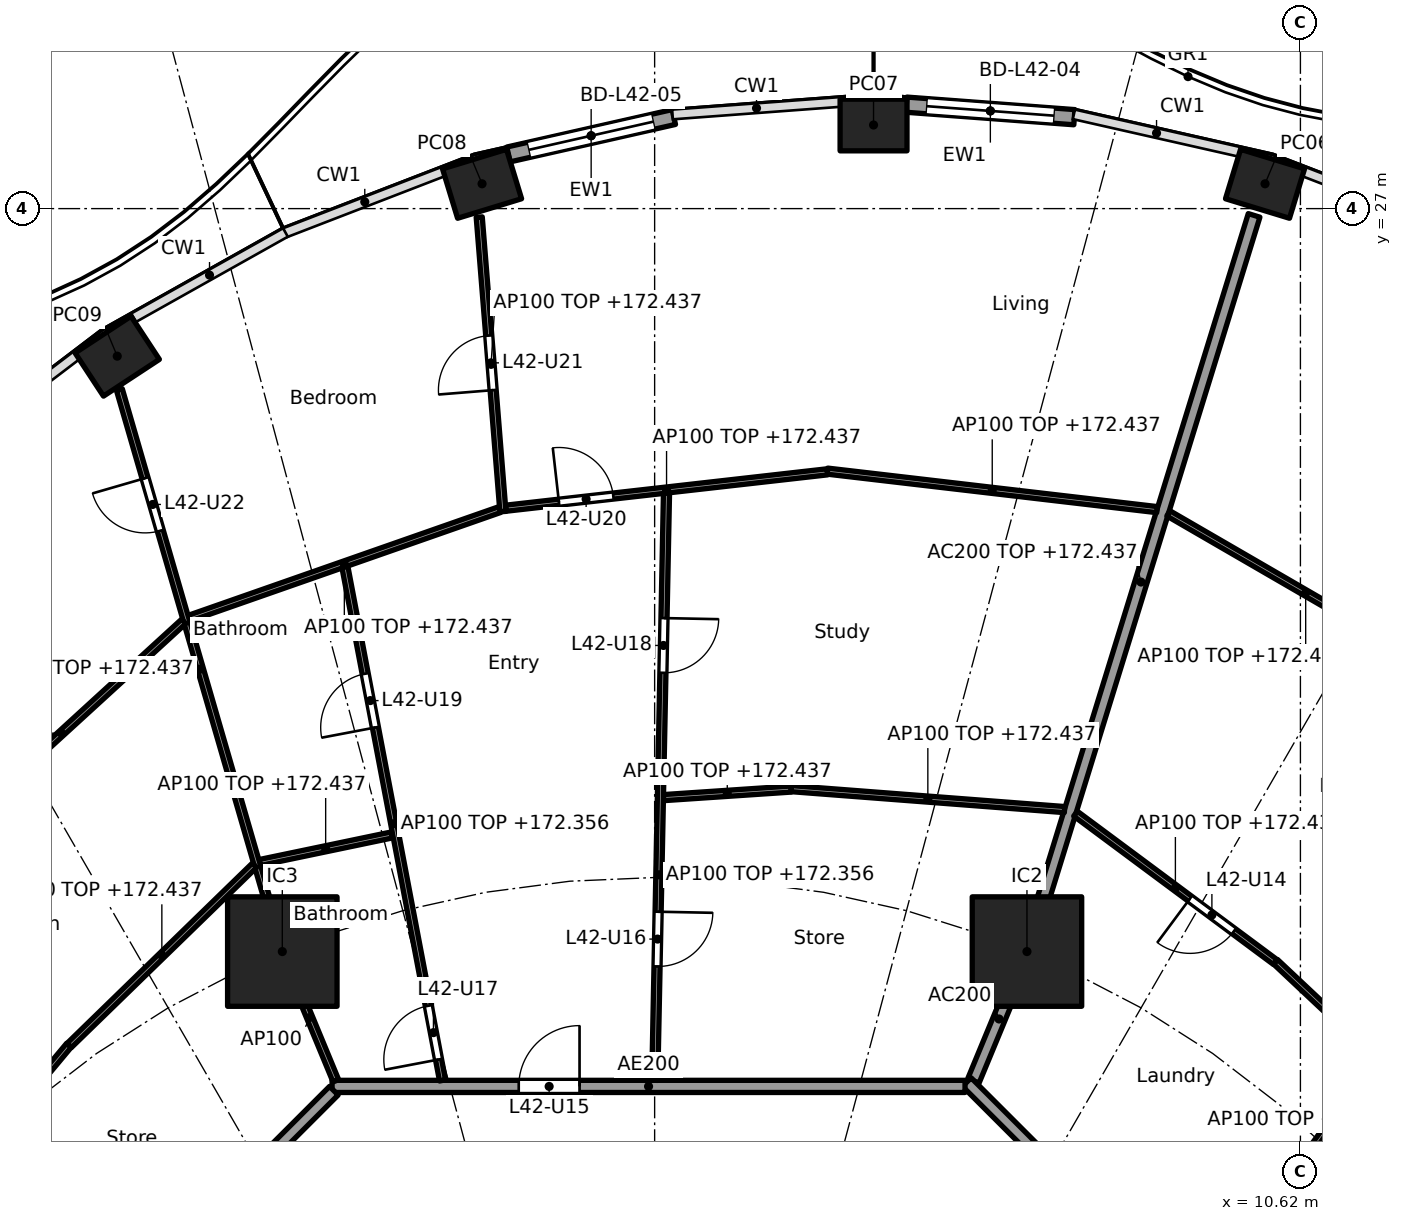
"""IFC4 building model, lengths in metres.
Left out: names, types, materials, properties, quantities, classifications, styles, units other than length and angle.
Written with IfcOpenShell. Run it as: python <this file> out.ifc"""

import sys

from ifc_helpers import new_model, si_unit, direction, frame, frame_2d, origin, origin_2d, place, context, subcontext, project, spatial, rectangle, hollow_rectangle, extrude, element, fill, save


model = new_model("IFC4")
c1 = context("Model", 3, precision=1e-05, world=origin(), true_north=direction((0.0, 1.0)))
c2 = subcontext(c1, "Body", "Model", "MODEL_VIEW")
j1 = project(units=[si_unit("LENGTHUNIT", "METRE"), si_unit("PLANEANGLEUNIT", "RADIAN")], contexts=[c1])
p1 = place(None, origin())
s1 = spatial("IfcSite", under=j1, at=p1, CompositionType="ELEMENT")
p2 = place(p1, origin())
s2 = spatial("IfcBuilding", under=s1, at=p2, CompositionType="ELEMENT")
p3 = place(p2, frame((0.0, 0.0, 169.6)))
s3 = spatial("IfcBuildingStorey", under=s2, at=p3, CompositionType="ELEMENT", Elevation=169.6)
for number, where, z_axis, x_axis in (
    (1, (10.038, 27.408, 0.0), (0.0, 0.0, 1.0), (-0.957, 0.292, 0.0)),
    (2, (3.6, 28.375, 0.0), (0.0, 0.0, 1.0), (-1.0, 0.0, 0.0)),
    (3, (-2.838, 27.408, 0.0), (0.0, 0.0, 1.0), (-0.957, -0.292, 0.0)),
    (4, (-8.837, 24.573, 0.0), (0.0, 0.0, 1.0), (-0.836, -0.549, 0.0)),
):
    element("IfcColumn", number, at=place(p3, frame(where, z_axis=z_axis, x_axis=x_axis)), inside=s3, PredefinedType="COLUMN", context=c2, shape_type="SweptSolid", body=[
        extrude(hollow_rectangle(XDim=1.1, YDim=0.85, WallThickness=0.036, at=origin_2d()), origin(), (0.0, 0.0, 1.0), 3.7),
    ])
for number, where, z_axis, x_axis in (
    (5, (6.123, 14.782, 0.0), (0.0, 0.0, 1.0), (1.0, 0.0, 0.0)),
    (6, (-6.123, 14.782, 0.0), (0.0, 0.0, 1.0), (1.0, 0.0, 0.0)),
):
    element("IfcColumn", number, at=place(p3, frame(where, z_axis=z_axis, x_axis=x_axis)), inside=s3, PredefinedType="COLUMN", context=c2, shape_type="SweptSolid", body=[
        extrude(rectangle(XDim=1.8, YDim=1.8, at=origin_2d()), origin(), (0.0, 0.0, 1.0), 3.7),
    ])
p4 = place(p3, frame((4.139, 28.709, 0.0), z_axis=(0.0, 0.0, 1.0), x_axis=(0.997232064422, -0.074351931305, 0.0)))
e7 = element("IfcWall", 7, at=p4, inside=s3, PredefinedType="SOLIDWALL", context=c2, shape_type="SweptSolid", body=[
    extrude(rectangle(XDim=2.771, YDim=0.25, at=frame_2d((1.386, 0.0))), origin(), (0.0, 0.0, 1.0), 3.44),
])
p5 = place(p4, frame((0.336, 0.0, 0.0)))
e8 = element("IfcOpeningElement", 8, at=p5, cuts=e7, PredefinedType="OPENING", context=c2, shape_type="SweptSolid", body=[
    extrude(rectangle(XDim=2.1, YDim=2.4, at=frame_2d((1.05, 1.2))), frame((0.0, 0.135, 0.0), z_axis=(0.0, -1.0, 0.0), x_axis=(1.0, 0.0, 0.0)), (0.0, 0.0, 1.0), 0.27),
])
p6 = place(p3, frame((-2.404, 27.891, 0.0), z_axis=(0.0, 0.0, 1.0), x_axis=(0.975324329911, 0.220776926974, 0.0)))
e9 = element("IfcWall", 9, at=p6, inside=s3, PredefinedType="SOLIDWALL", context=c2, shape_type="SweptSolid", body=[
    extrude(rectangle(XDim=2.788, YDim=0.25, at=frame_2d((1.394, 0.0))), origin(), (0.0, 0.0, 1.0), 3.44),
])
p7 = place(p6, frame((0.344, 0.0, 0.0)))
e10 = element("IfcOpeningElement", 10, at=p7, cuts=e9, PredefinedType="OPENING", context=c2, shape_type="SweptSolid", body=[
    extrude(rectangle(XDim=2.1, YDim=2.4, at=frame_2d((1.05, 1.2))), frame((0.0, 0.135, 0.0), z_axis=(0.0, -1.0, 0.0), x_axis=(1.0, 0.0, 0.0)), (0.0, 0.0, 1.0), 0.27),
])
p8 = place(p3, frame((5.243, 12.657, 0.0), z_axis=(0.0, 0.0, 1.0), x_axis=(0.382747093259, 0.923853160736, 0.0)))
e11 = element("IfcWall", 11, at=p8, inside=s3, PredefinedType="PARTITIONING", context=c2, shape_type="SweptSolid", body=[
    extrude(rectangle(XDim=2.2, YDim=0.2, at=frame_2d((1.1, 0.0))), origin(), (0.0, 0.0, 1.0), 3.44),
])
p9 = place(p3, frame((6.138, 14.83, 0.0), z_axis=(0.0, 0.0, 1.0), x_axis=(0.294818517221, 0.955553264818, 0.0)))
e12 = element("IfcWall", 12, at=p9, inside=s3, PredefinedType="PARTITIONING", context=c2, shape_type="SweptSolid", body=[
    extrude(rectangle(XDim=12.619, YDim=0.2, at=frame_2d((6.31, 0.0))), origin(), (0.0, 0.0, 1.0), 2.837),
])
p10 = place(p3, frame((12.635, 5.134, 0.0), z_axis=(0.0, 0.0, 1.0), x_axis=(-0.707106781187, 0.707106781187, 0.0)))
e13 = element("IfcWall", 13, at=p10, inside=s3, PredefinedType="PARTITIONING", context=c2, shape_type="SweptSolid", body=[
    extrude(rectangle(XDim=10.609, YDim=0.2, at=frame_2d((5.305, 0.0))), origin(), (0.0, 0.0, 1.0), 3.44),
])
p11 = place(p3, frame((5.104, 12.565, 0.0), z_axis=(0.0, 0.0, 1.0), x_axis=(-1.0, 0.0, 0.0)))
e14 = element("IfcWall", 14, at=p11, inside=s3, PredefinedType="PARTITIONING", context=c2, shape_type="SweptSolid", body=[
    extrude(rectangle(XDim=10.409, YDim=0.2, at=frame_2d((5.205, 0.0))), origin(), (0.0, 0.0, 1.0), 3.44),
])
p12 = place(p11, frame((6.339, 0.0, 0.0)))
e15 = element("IfcOpeningElement", 15, at=p12, cuts=e14, PredefinedType="OPENING", context=c2, shape_type="SweptSolid", body=[
    extrude(rectangle(XDim=1.0, YDim=2.1, at=frame_2d((0.5, 1.05))), frame((0.0, 0.11, 0.0), z_axis=(0.0, -1.0, 0.0), x_axis=(1.0, 0.0, 0.0)), (0.0, 0.0, 1.0), 0.22),
])
p13 = place(p3, frame((-5.275, 12.494, 0.0), z_axis=(0.0, 0.0, 1.0), x_axis=(-0.707106781187, -0.707106781187, 0.0)))
e16 = element("IfcWall", 16, at=p13, inside=s3, PredefinedType="PARTITIONING", context=c2, shape_type="SweptSolid", body=[
    extrude(rectangle(XDim=10.209, YDim=0.2, at=frame_2d((5.104, 0.0))), origin(), (0.0, 0.0, 1.0), 3.44),
])
p14 = place(p3, frame((13.504, 11.52, 0.0), z_axis=(0.0, 0.0, 1.0), x_axis=(-0.728883199496, 0.684638066055, 0.0)))
e17 = element("IfcWall", 17, at=p14, inside=s3, PredefinedType="PARTITIONING", context=c2, shape_type="SweptSolid", body=[
    extrude(rectangle(XDim=4.519, YDim=0.1, at=frame_2d((2.26, 0.0))), origin(), (0.0, 0.0, 1.0), 2.837),
])
p15 = place(p3, frame((8.943, 8.966, 0.0), z_axis=(0.0, 0.0, 1.0), x_axis=(0.587187896734, 0.809450661825, 0.0)))
e18 = element("IfcWall", 18, at=p15, inside=s3, PredefinedType="PARTITIONING", context=c2, shape_type="SweptSolid", body=[
    extrude(rectangle(XDim=4.975, YDim=0.1, at=frame_2d((2.487, 0.0))), origin(), (0.0, 0.0, 1.0), 2.756),
])
p16 = place(p3, frame((10.207, 14.61, 0.0), z_axis=(0.0, 0.0, 1.0), x_axis=(-0.802769141821, 0.596289950394, 0.0)))
e19 = element("IfcWall", 19, at=p16, inside=s3, PredefinedType="PARTITIONING", context=c2, shape_type="SweptSolid", body=[
    extrude(rectangle(XDim=4.092, YDim=0.1, at=frame_2d((2.046, 0.0))), origin(), (0.0, 0.0, 1.0), 2.837),
])
p17 = place(p16, frame((0.848, 0.0, 0.0)))
e20 = element("IfcOpeningElement", 20, at=p17, cuts=e19, PredefinedType="OPENING", context=c2, shape_type="SweptSolid", body=[
    extrude(rectangle(XDim=0.9, YDim=2.1, at=frame_2d((0.45, 1.05))), frame((0.0, 0.06, 0.0), z_axis=(0.0, -1.0, 0.0), x_axis=(1.0, 0.0, 0.0)), (0.0, 0.0, 1.0), 0.12),
])
p18 = place(p3, frame((12.965, 19.371, 0.0), z_axis=(0.0, 0.0, 1.0), x_axis=(-0.865286427811, 0.501277765163, 0.0)))
e21 = element("IfcWall", 21, at=p18, inside=s3, PredefinedType="PARTITIONING", context=c2, shape_type="SweptSolid", body=[
    extrude(rectangle(XDim=5.22, YDim=0.1, at=frame_2d((2.61, 0.0))), origin(), (0.0, 0.0, 1.0), 2.837),
])
p19 = place(p3, frame((6.741, 17.117, 0.0), z_axis=(0.0, 0.0, 1.0), x_axis=(-0.997078320723, 0.076386008825, 0.0)))
e22 = element("IfcWall", 22, at=p19, inside=s3, PredefinedType="PARTITIONING", context=c2, shape_type="SweptSolid", body=[
    extrude(rectangle(XDim=4.51, YDim=0.1, at=frame_2d((2.255, 0.0))), origin(), (0.0, 0.0, 1.0), 2.837),
])
p20 = place(p3, frame((8.262, 22.05, 0.0), z_axis=(0.0, 0.0, 1.0), x_axis=(-0.993250089265, 0.115992500516, 0.0)))
e23 = element("IfcWall", 23, at=p20, inside=s3, PredefinedType="PARTITIONING", context=c2, shape_type="SweptSolid", body=[
    extrude(rectangle(XDim=5.458, YDim=0.1, at=frame_2d((2.729, 0.0))), origin(), (0.0, 0.0, 1.0), 2.837),
])
p21 = place(p3, frame((2.244, 17.455, 0.0), z_axis=(0.0, 0.0, 1.0), x_axis=(-0.997756833447, -0.06694252243, 0.0)))
e24 = element("IfcWall", 24, at=p21, inside=s3, PredefinedType="PARTITIONING", context=c2, shape_type="SweptSolid", body=[
    extrude(rectangle(XDim=2.104, YDim=0.1, at=frame_2d((1.052, 0.0))), origin(), (0.0, 0.0, 1.0), 2.837),
])
p22 = place(p3, frame((2.842, 22.671, 0.0), z_axis=(0.0, 0.0, 1.0), x_axis=(-0.993660315081, -0.112424099879, 0.0)))
e25 = element("IfcWall", 25, at=p22, inside=s3, PredefinedType="PARTITIONING", context=c2, shape_type="SweptSolid", body=[
    extrude(rectangle(XDim=5.325, YDim=0.1, at=frame_2d((2.662, 0.0))), origin(), (0.0, 0.0, 1.0), 2.837),
])
p23 = place(p22, frame((3.544, 0.0, 0.0)))
e26 = element("IfcOpeningElement", 26, at=p23, cuts=e25, PredefinedType="OPENING", context=c2, shape_type="SweptSolid", body=[
    extrude(rectangle(XDim=0.9, YDim=2.1, at=frame_2d((0.45, 1.05))), frame((0.0, 0.06, 0.0), z_axis=(0.0, -1.0, 0.0), x_axis=(1.0, 0.0, 0.0)), (0.0, 0.0, 1.0), 0.12),
])
p24 = place(p3, frame((0.002, 12.665, 0.0), z_axis=(0.0, 0.0, 1.0), x_axis=(0.019992969345, 0.999800120613, 0.0)))
e27 = element("IfcWall", 27, at=p24, inside=s3, PredefinedType="PARTITIONING", context=c2, shape_type="SweptSolid", body=[
    extrude(rectangle(XDim=9.659, YDim=0.1, at=frame_2d((4.83, 0.0))), origin(), (0.0, 0.0, 1.0), 2.756),
])
p25 = place(p24, frame((1.873, 0.0, 0.0)))
e28 = element("IfcOpeningElement", 28, at=p25, cuts=e27, PredefinedType="OPENING", context=c2, shape_type="SweptSolid", body=[
    extrude(rectangle(XDim=0.9, YDim=2.1, at=frame_2d((0.45, 1.05))), frame((0.0, 0.06, 0.0), z_axis=(0.0, -1.0, 0.0), x_axis=(1.0, 0.0, 0.0)), (0.0, 0.0, 1.0), 0.12),
])
p26 = place(p24, frame((6.703, 0.0, 0.0)))
e29 = element("IfcOpeningElement", 29, at=p26, cuts=e27, PredefinedType="OPENING", context=c2, shape_type="SweptSolid", body=[
    extrude(rectangle(XDim=0.9, YDim=2.1, at=frame_2d((0.45, 1.05))), frame((0.0, 0.06, 0.0), z_axis=(0.0, -1.0, 0.0), x_axis=(1.0, 0.0, 0.0)), (0.0, 0.0, 1.0), 0.12),
])
p27 = place(p3, frame((-2.495, 22.017, 0.0), z_axis=(0.0, 0.0, 1.0), x_axis=(-0.080150660566, 0.99678276049, 0.0)))
e30 = element("IfcWall", 30, at=p27, inside=s3, PredefinedType="PARTITIONING", context=c2, shape_type="SweptSolid", body=[
    extrude(rectangle(XDim=4.858, YDim=0.1, at=frame_2d((2.429, 0.0))), origin(), (0.0, 0.0, 1.0), 2.837),
])
p28 = place(p27, frame((2.004, 0.0, 0.0)))
e31 = element("IfcOpeningElement", 31, at=p28, cuts=e30, PredefinedType="OPENING", context=c2, shape_type="SweptSolid", body=[
    extrude(rectangle(XDim=0.9, YDim=2.1, at=frame_2d((0.45, 1.05))), frame((0.0, 0.06, 0.0), z_axis=(0.0, -1.0, 0.0), x_axis=(1.0, 0.0, 0.0)), (0.0, 0.0, 1.0), 0.12),
])
p29 = place(p3, frame((-2.546, 22.051, 0.0), z_axis=(0.0, 0.0, 1.0), x_axis=(-0.943911038661, -0.330199865375, 0.0)))
e32 = element("IfcWall", 32, at=p29, inside=s3, PredefinedType="PARTITIONING", context=c2, shape_type="SweptSolid", body=[
    extrude(rectangle(XDim=5.417, YDim=0.1, at=frame_2d((2.709, 0.0))), origin(), (0.0, 0.0, 1.0), 2.837),
])
p30 = place(p3, frame((-3.488, 12.663, 0.0), z_axis=(0.0, 0.0, 1.0), x_axis=(-0.186783185485, 0.982401161247, 0.0)))
e33 = element("IfcWall", 33, at=p30, inside=s3, PredefinedType="PARTITIONING", context=c2, shape_type="SweptSolid", body=[
    extrude(rectangle(XDim=8.595, YDim=0.1, at=frame_2d((4.298, 0.0))), origin(), (0.0, 0.0, 1.0), 2.756),
])
p31 = place(p30, frame((0.35, 0.0, 0.0)))
e34 = element("IfcOpeningElement", 34, at=p31, cuts=e33, PredefinedType="OPENING", context=c2, shape_type="SweptSolid", body=[
    extrude(rectangle(XDim=0.9, YDim=2.1, at=frame_2d((0.45, 1.05))), frame((0.0, 0.06, 0.0), z_axis=(0.0, -1.0, 0.0), x_axis=(1.0, 0.0, 0.0)), (0.0, 0.0, 1.0), 0.12),
])
p32 = place(p30, frame((5.908, 0.0, 0.0)))
e35 = element("IfcOpeningElement", 35, at=p32, cuts=e33, PredefinedType="OPENING", context=c2, shape_type="SweptSolid", body=[
    extrude(rectangle(XDim=0.9, YDim=2.1, at=frame_2d((0.45, 1.05))), frame((0.0, 0.06, 0.0), z_axis=(0.0, -1.0, 0.0), x_axis=(1.0, 0.0, 0.0)), (0.0, 0.0, 1.0), 0.12),
])
p33 = place(p3, frame((-4.324, 16.699, 0.0), z_axis=(0.0, 0.0, 1.0), x_axis=(-0.978908011866, -0.204301503432, 0.0)))
e36 = element("IfcWall", 36, at=p33, inside=s3, PredefinedType="PARTITIONING", context=c2, shape_type="SweptSolid", body=[
    extrude(rectangle(XDim=2.218, YDim=0.1, at=frame_2d((1.109, 0.0))), origin(), (0.0, 0.0, 1.0), 2.837),
])
p34 = place(p3, frame((-5.243, 12.657, 0.0), z_axis=(0.0, 0.0, 1.0), x_axis=(-0.382719158442, 0.923864733477, 0.0)))
e37 = element("IfcWall", 37, at=p34, inside=s3, PredefinedType="PARTITIONING", context=c2, shape_type="SweptSolid", body=[
    extrude(rectangle(XDim=2.25, YDim=0.1, at=frame_2d((1.125, 0.0))), origin(), (0.0, 0.0, 1.0), 3.44),
])
p35 = place(p3, frame((-6.137, 14.83, 0.0), z_axis=(0.0, 0.0, 1.0), x_axis=(-0.278461169897, 0.96044748782, 0.0)))
e38 = element("IfcWall", 38, at=p35, inside=s3, PredefinedType="PARTITIONING", context=c2, shape_type="SweptSolid", body=[
    extrude(rectangle(XDim=9.573, YDim=0.1, at=frame_2d((4.787, 0.0))), origin(), (0.0, 0.0, 1.0), 2.837),
])
p36 = place(p35, frame((7.156, 0.0, 0.0)))
e39 = element("IfcOpeningElement", 39, at=p36, cuts=e38, PredefinedType="OPENING", context=c2, shape_type="SweptSolid", body=[
    extrude(rectangle(XDim=0.9, YDim=2.1, at=frame_2d((0.45, 1.05))), frame((0.0, 0.06, 0.0), z_axis=(0.0, -1.0, 0.0), x_axis=(1.0, 0.0, 0.0)), (0.0, 0.0, 1.0), 0.12),
])
p37 = place(p3, frame((-6.58, 16.201, 0.0), z_axis=(0.0, 0.0, 1.0), x_axis=(-0.716946269374, -0.697128429223, 0.0)))
e40 = element("IfcWall", 40, at=p37, inside=s3, PredefinedType="PARTITIONING", context=c2, shape_type="SweptSolid", body=[
    extrude(rectangle(XDim=4.25, YDim=0.1, at=frame_2d((2.125, 0.0))), origin(), (0.0, 0.0, 1.0), 2.837),
])
p38 = place(p3, frame((-7.744, 20.212, 0.0), z_axis=(0.0, 0.0, 1.0), x_axis=(-0.738051761282, -0.674744097913, 0.0)))
e41 = element("IfcWall", 41, at=p38, inside=s3, PredefinedType="PARTITIONING", context=c2, shape_type="SweptSolid", body=[
    extrude(rectangle(XDim=5.449, YDim=0.1, at=frame_2d((2.725, 0.0))), origin(), (0.0, 0.0, 1.0), 2.837),
])
p39 = place(p3, frame((-9.631, 13.242, 0.0), z_axis=(0.0, 0.0, 1.0), x_axis=(-0.640315711982, -0.768111833647, 0.0)))
e42 = element("IfcWall", 42, at=p39, inside=s3, PredefinedType="PARTITIONING", context=c2, shape_type="SweptSolid", body=[
    extrude(rectangle(XDim=4.572, YDim=0.1, at=frame_2d((2.286, 0.0))), origin(), (0.0, 0.0, 1.0), 2.837),
])
p40 = place(p39, frame((1.861, 0.0, 0.0)))
e43 = element("IfcOpeningElement", 43, at=p40, cuts=e42, PredefinedType="OPENING", context=c2, shape_type="SweptSolid", body=[
    extrude(rectangle(XDim=0.9, YDim=2.1, at=frame_2d((0.45, 1.05))), frame((0.0, 0.06, 0.0), z_axis=(0.0, -1.0, 0.0), x_axis=(1.0, 0.0, 0.0)), (0.0, 0.0, 1.0), 0.12),
])
p41 = place(p5, origin())
e44 = element("IfcDoor", 44, at=p41, inside=s3, OperationType="SLIDING_TO_LEFT", PredefinedType="DOOR", context=c2, shape_type="SweptSolid", body=[
    extrude(rectangle(XDim=2.1, YDim=2.4, at=frame_2d((1.05, 1.2))), frame((0.0, 0.025, 0.0), z_axis=(0.0, -1.0, 0.0), x_axis=(1.0, 0.0, 0.0)), (0.0, 0.0, 1.0), 0.05),
])
fill(e8, e44)
p42 = place(p7, origin())
e45 = element("IfcDoor", 45, at=p42, inside=s3, OperationType="SLIDING_TO_LEFT", PredefinedType="DOOR", context=c2, shape_type="SweptSolid", body=[
    extrude(rectangle(XDim=2.1, YDim=2.4, at=frame_2d((1.05, 1.2))), frame((0.0, 0.025, 0.0), z_axis=(0.0, -1.0, 0.0), x_axis=(1.0, 0.0, 0.0)), (0.0, 0.0, 1.0), 0.05),
])
fill(e10, e45)
p43 = place(p17, origin())
e46 = element("IfcDoor", 46, at=p43, inside=s3, OperationType="SINGLE_SWING_RIGHT", PredefinedType="DOOR", context=c2, shape_type="SweptSolid", body=[
    extrude(rectangle(XDim=0.9, YDim=2.1, at=frame_2d((0.45, 1.05))), frame((0.0, 0.025, 0.0), z_axis=(0.0, -1.0, 0.0), x_axis=(1.0, 0.0, 0.0)), (0.0, 0.0, 1.0), 0.05),
])
fill(e20, e46)
p44 = place(p12, frame((1.0, 0.0, 0.0), x_axis=(-1.0, 0.0, 0.0)))
e47 = element("IfcDoor", 47, at=p44, inside=s3, OperationType="SINGLE_SWING_RIGHT", PredefinedType="DOOR", context=c2, shape_type="SweptSolid", body=[
    extrude(rectangle(XDim=1.0, YDim=2.1, at=frame_2d((0.5, 1.05))), frame((0.0, 0.025, 0.0), z_axis=(0.0, -1.0, 0.0), x_axis=(1.0, 0.0, 0.0)), (0.0, 0.0, 1.0), 0.05),
])
fill(e15, e47)
p45 = place(p25, frame((0.9, 0.0, 0.0), x_axis=(-1.0, 0.0, 0.0)))
e48 = element("IfcDoor", 48, at=p45, inside=s3, OperationType="SINGLE_SWING_LEFT", PredefinedType="DOOR", context=c2, shape_type="SweptSolid", body=[
    extrude(rectangle(XDim=0.9, YDim=2.1, at=frame_2d((0.45, 1.05))), frame((0.0, 0.025, 0.0), z_axis=(0.0, -1.0, 0.0), x_axis=(1.0, 0.0, 0.0)), (0.0, 0.0, 1.0), 0.05),
])
fill(e28, e48)
p46 = place(p31, origin())
e49 = element("IfcDoor", 49, at=p46, inside=s3, OperationType="SINGLE_SWING_LEFT", PredefinedType="DOOR", context=c2, shape_type="SweptSolid", body=[
    extrude(rectangle(XDim=0.9, YDim=2.1, at=frame_2d((0.45, 1.05))), frame((0.0, 0.025, 0.0), z_axis=(0.0, -1.0, 0.0), x_axis=(1.0, 0.0, 0.0)), (0.0, 0.0, 1.0), 0.05),
])
fill(e34, e49)
p47 = place(p26, frame((0.9, 0.0, 0.0), x_axis=(-1.0, 0.0, 0.0)))
e50 = element("IfcDoor", 50, at=p47, inside=s3, OperationType="SINGLE_SWING_LEFT", PredefinedType="DOOR", context=c2, shape_type="SweptSolid", body=[
    extrude(rectangle(XDim=0.9, YDim=2.1, at=frame_2d((0.45, 1.05))), frame((0.0, 0.025, 0.0), z_axis=(0.0, -1.0, 0.0), x_axis=(1.0, 0.0, 0.0)), (0.0, 0.0, 1.0), 0.05),
])
fill(e29, e50)
p48 = place(p32, origin())
e51 = element("IfcDoor", 51, at=p48, inside=s3, OperationType="SINGLE_SWING_LEFT", PredefinedType="DOOR", context=c2, shape_type="SweptSolid", body=[
    extrude(rectangle(XDim=0.9, YDim=2.1, at=frame_2d((0.45, 1.05))), frame((0.0, 0.025, 0.0), z_axis=(0.0, -1.0, 0.0), x_axis=(1.0, 0.0, 0.0)), (0.0, 0.0, 1.0), 0.05),
])
fill(e35, e51)
p49 = place(p23, frame((0.9, 0.0, 0.0), x_axis=(-1.0, 0.0, 0.0)))
e52 = element("IfcDoor", 52, at=p49, inside=s3, OperationType="SINGLE_SWING_LEFT", PredefinedType="DOOR", context=c2, shape_type="SweptSolid", body=[
    extrude(rectangle(XDim=0.9, YDim=2.1, at=frame_2d((0.45, 1.05))), frame((0.0, 0.025, 0.0), z_axis=(0.0, -1.0, 0.0), x_axis=(1.0, 0.0, 0.0)), (0.0, 0.0, 1.0), 0.05),
])
fill(e26, e52)
p50 = place(p28, origin())
e53 = element("IfcDoor", 53, at=p50, inside=s3, OperationType="SINGLE_SWING_LEFT", PredefinedType="DOOR", context=c2, shape_type="SweptSolid", body=[
    extrude(rectangle(XDim=0.9, YDim=2.1, at=frame_2d((0.45, 1.05))), frame((0.0, 0.025, 0.0), z_axis=(0.0, -1.0, 0.0), x_axis=(1.0, 0.0, 0.0)), (0.0, 0.0, 1.0), 0.05),
])
fill(e31, e53)
p51 = place(p36, origin())
e54 = element("IfcDoor", 54, at=p51, inside=s3, OperationType="SINGLE_SWING_RIGHT", PredefinedType="DOOR", context=c2, shape_type="SweptSolid", body=[
    extrude(rectangle(XDim=0.9, YDim=2.1, at=frame_2d((0.45, 1.05))), frame((0.0, 0.025, 0.0), z_axis=(0.0, -1.0, 0.0), x_axis=(1.0, 0.0, 0.0)), (0.0, 0.0, 1.0), 0.05),
])
fill(e39, e54)
save(model, sys.argv[1])
